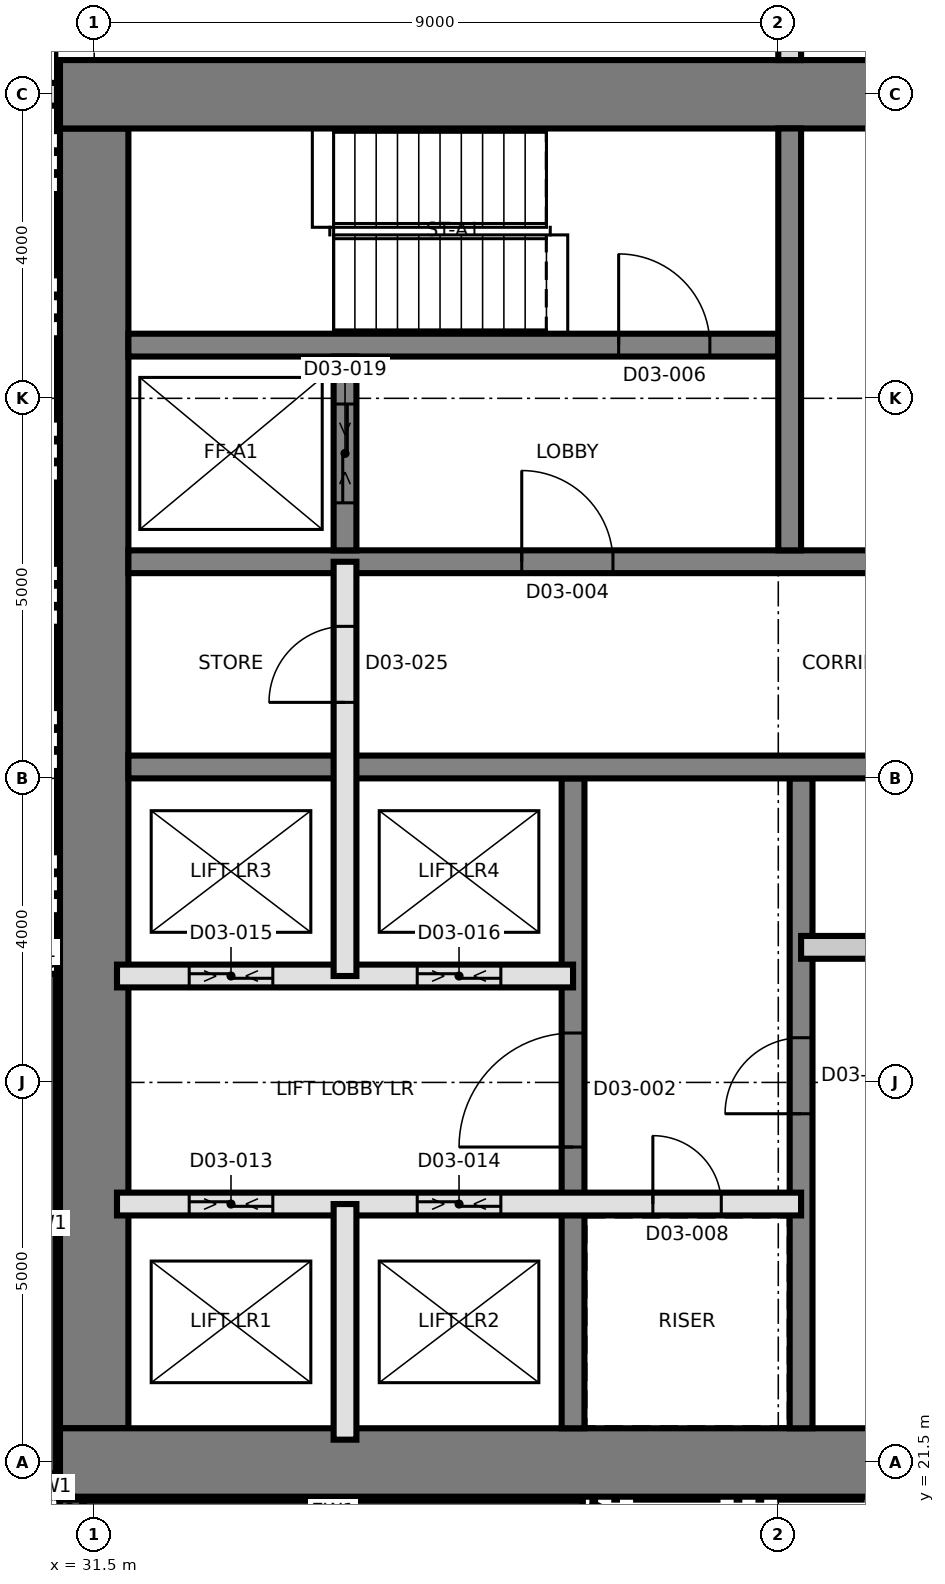
"""IFC4 building model, lengths in metres.
Left out: names, types, materials, properties, quantities, classifications, styles, units other than length and angle.
Written with IfcOpenShell. Run it as: python <this file> out.ifc"""

import sys

from ifc_helpers import new_model, si_unit, direction, frame, frame_2d, origin, place, context, subcontext, project, spatial, rectangle, extrude, element, fill, save


model = new_model("IFC4")
c1 = context("Model", 3, precision=1e-05, world=origin(), true_north=direction((0.0, 1.0)))
c2 = subcontext(c1, "Body", "Model", "MODEL_VIEW")
j1 = project(units=[si_unit("LENGTHUNIT", "METRE"), si_unit("PLANEANGLEUNIT", "RADIAN")], contexts=[c1])
p1 = place(None, origin())
s1 = spatial("IfcSite", under=j1, at=p1, CompositionType="ELEMENT")
p2 = place(p1, origin())
s2 = spatial("IfcBuilding", under=s1, at=p2, CompositionType="ELEMENT")
p3 = place(p2, frame((0.0, 0.0, 52.0)))
s3 = spatial("IfcBuildingStorey", under=s2, at=p3, CompositionType="ELEMENT", Elevation=52.0)
p4 = place(p3, frame((31.5, 21.95, 0.0), z_axis=(0.0, 0.0, 1.0), x_axis=(0.0, 1.0, 0.0)))
e1 = element("IfcWall", 1, at=p4, inside=s3, PredefinedType="SHEAR", context=c2, shape_type="SweptSolid", body=[
    extrude(rectangle(XDim=17.1, YDim=0.9, at=frame_2d((8.55, 0.0))), origin(), (0.0, 0.0, 1.0), 3.7),
])
p5 = place(p3, frame((31.05, 21.5, 0.0), z_axis=(0.0, 0.0, 1.0), x_axis=(1.0, 0.0, 0.0)))
e2 = element("IfcWall", 2, at=p5, inside=s3, PredefinedType="SHEAR", context=c2, shape_type="SweptSolid", body=[
    extrude(rectangle(XDim=27.0, YDim=0.9, at=frame_2d((13.5, 0.0))), origin(), (0.0, 0.0, 1.0), 3.7),
])
p6 = place(p3, frame((31.05, 39.5, 0.0), z_axis=(0.0, 0.0, 1.0), x_axis=(1.0, 0.0, 0.0)))
e3 = element("IfcWall", 3, at=p6, inside=s3, PredefinedType="SHEAR", context=c2, shape_type="SweptSolid", body=[
    extrude(rectangle(XDim=27.0, YDim=0.9, at=frame_2d((13.5, 0.0))), origin(), (0.0, 0.0, 1.0), 3.7),
])
p7 = place(p6, frame((10.65, 0.0, 0.0)))
e4 = element("IfcOpeningElement", 4, at=p7, cuts=e3, PredefinedType="OPENING", context=c2, shape_type="SweptSolid", body=[
    extrude(rectangle(XDim=1.2, YDim=2.1, at=frame_2d((0.6, 1.05))), frame((0.0, 0.46, 0.0), z_axis=(0.0, -1.0, 0.0), x_axis=(1.0, 0.0, 0.0)), (0.0, 0.0, 1.0), 0.92),
])
p8 = place(p3, frame((37.8, 21.95, 0.0), z_axis=(0.0, 0.0, 1.0), x_axis=(0.0, 1.0, 0.0)))
e5 = element("IfcWall", 5, at=p8, inside=s3, PredefinedType="SHEAR", context=c2, shape_type="SweptSolid", body=[
    extrude(rectangle(XDim=8.55, YDim=0.3, at=frame_2d((4.275, 0.0))), origin(), (0.0, 0.0, 1.0), 3.7),
])
p9 = place(p8, frame((3.7, 0.0, 0.0)))
e6 = element("IfcOpeningElement", 6, at=p9, cuts=e5, PredefinedType="OPENING", context=c2, shape_type="SweptSolid", body=[
    extrude(rectangle(XDim=1.5, YDim=2.1, at=frame_2d((0.75, 1.05))), frame((0.0, 0.16, 0.0), z_axis=(0.0, -1.0, 0.0), x_axis=(1.0, 0.0, 0.0)), (0.0, 0.0, 1.0), 0.32),
])
p10 = place(p3, frame((40.8, 21.95, 0.0), z_axis=(0.0, 0.0, 1.0), x_axis=(0.0, 1.0, 0.0)))
e7 = element("IfcWall", 7, at=p10, inside=s3, PredefinedType="SHEAR", context=c2, shape_type="SweptSolid", body=[
    extrude(rectangle(XDim=8.55, YDim=0.3, at=frame_2d((4.275, 0.0))), origin(), (0.0, 0.0, 1.0), 3.7),
])
p11 = place(p10, frame((4.138, 0.0, 0.0)))
e8 = element("IfcOpeningElement", 8, at=p11, cuts=e7, PredefinedType="OPENING", context=c2, shape_type="SweptSolid", body=[
    extrude(rectangle(XDim=1.0, YDim=2.1, at=frame_2d((0.5, 1.05))), frame((0.0, 0.16, 0.0), z_axis=(0.0, -1.0, 0.0), x_axis=(1.0, 0.0, 0.0)), (0.0, 0.0, 1.0), 0.32),
])
p12 = place(p3, frame((31.95, 30.65, 0.0), z_axis=(0.0, 0.0, 1.0), x_axis=(1.0, 0.0, 0.0)))
e9 = element("IfcWall", 9, at=p12, inside=s3, PredefinedType="SHEAR", context=c2, shape_type="SweptSolid", body=[
    extrude(rectangle(XDim=26.1, YDim=0.3, at=frame_2d((13.05, 0.0))), origin(), (0.0, 0.0, 1.0), 3.7),
])
p13 = place(p12, frame((24.55, 0.0, 0.0)))
e10 = element("IfcOpeningElement", 10, at=p13, cuts=e9, PredefinedType="OPENING", context=c2, shape_type="SweptSolid", body=[
    extrude(rectangle(XDim=1.0, YDim=2.1, at=frame_2d((0.5, 1.05))), frame((0.0, 0.16, 0.0), z_axis=(0.0, -1.0, 0.0), x_axis=(1.0, 0.0, 0.0)), (0.0, 0.0, 1.0), 0.32),
])
p14 = place(p12, frame((11.35, 0.0, 0.0)))
e11 = element("IfcOpeningElement", 11, at=p14, cuts=e9, PredefinedType="OPENING", context=c2, shape_type="SweptSolid", body=[
    extrude(rectangle(XDim=1.0, YDim=2.1, at=frame_2d((0.5, 1.05))), frame((0.0, 0.16, 0.0), z_axis=(0.0, -1.0, 0.0), x_axis=(1.0, 0.0, 0.0)), (0.0, 0.0, 1.0), 0.32),
])
p15 = place(p3, frame((31.95, 33.35, 0.0), z_axis=(0.0, 0.0, 1.0), x_axis=(1.0, 0.0, 0.0)))
e12 = element("IfcWall", 12, at=p15, inside=s3, PredefinedType="SHEAR", context=c2, shape_type="SweptSolid", body=[
    extrude(rectangle(XDim=26.1, YDim=0.3, at=frame_2d((13.05, 0.0))), origin(), (0.0, 0.0, 1.0), 3.7),
])
p16 = place(p15, frame((13.125, 0.0, 0.0)))
e13 = element("IfcOpeningElement", 13, at=p16, cuts=e12, PredefinedType="OPENING", context=c2, shape_type="SweptSolid", body=[
    extrude(rectangle(XDim=1.4, YDim=2.1, at=frame_2d((0.7, 1.05))), frame((0.0, 0.16, 0.0), z_axis=(0.0, -1.0, 0.0), x_axis=(1.0, 0.0, 0.0)), (0.0, 0.0, 1.0), 0.32),
])
p17 = place(p15, frame((5.175, 0.0, 0.0)))
e14 = element("IfcOpeningElement", 14, at=p17, cuts=e12, PredefinedType="OPENING", context=c2, shape_type="SweptSolid", body=[
    extrude(rectangle(XDim=1.2, YDim=2.1, at=frame_2d((0.6, 1.05))), frame((0.0, 0.16, 0.0), z_axis=(0.0, -1.0, 0.0), x_axis=(1.0, 0.0, 0.0)), (0.0, 0.0, 1.0), 0.32),
])
p18 = place(p15, frame((19.725, 0.0, 0.0)))
e15 = element("IfcOpeningElement", 15, at=p18, cuts=e12, PredefinedType="OPENING", context=c2, shape_type="SweptSolid", body=[
    extrude(rectangle(XDim=1.2, YDim=2.1, at=frame_2d((0.6, 1.05))), frame((0.0, 0.16, 0.0), z_axis=(0.0, -1.0, 0.0), x_axis=(1.0, 0.0, 0.0)), (0.0, 0.0, 1.0), 0.32),
])
p19 = place(p3, frame((31.95, 36.2, 0.0), z_axis=(0.0, 0.0, 1.0), x_axis=(1.0, 0.0, 0.0)))
e16 = element("IfcWall", 16, at=p19, inside=s3, PredefinedType="SHEAR", context=c2, shape_type="SweptSolid", body=[
    extrude(rectangle(XDim=8.55, YDim=0.3, at=frame_2d((4.275, 0.0))), origin(), (0.0, 0.0, 1.0), 3.7),
])
p20 = place(p19, frame((6.45, 0.0, 0.0)))
e17 = element("IfcOpeningElement", 17, at=p20, cuts=e16, PredefinedType="OPENING", context=c2, shape_type="SweptSolid", body=[
    extrude(rectangle(XDim=1.2, YDim=2.1, at=frame_2d((0.6, 1.05))), frame((0.0, 0.16, 0.0), z_axis=(0.0, -1.0, 0.0), x_axis=(1.0, 0.0, 0.0)), (0.0, 0.0, 1.0), 0.32),
])
p21 = place(p3, frame((40.65, 33.5, 0.0), z_axis=(0.0, 0.0, 1.0), x_axis=(0.0, 1.0, 0.0)))
e18 = element("IfcWall", 18, at=p21, inside=s3, PredefinedType="SHEAR", context=c2, shape_type="SweptSolid", body=[
    extrude(rectangle(XDim=5.55, YDim=0.3, at=frame_2d((2.775, 0.0))), origin(), (0.0, 0.0, 1.0), 3.7),
])
p22 = place(p3, frame((34.8, 33.5, 0.0), z_axis=(0.0, 0.0, 1.0), x_axis=(0.0, 1.0, 0.0)))
e19 = element("IfcWall", 19, at=p22, inside=s3, PredefinedType="SHEAR", context=c2, shape_type="SweptSolid", body=[
    extrude(rectangle(XDim=2.55, YDim=0.3, at=frame_2d((1.275, 0.0))), origin(), (0.0, 0.0, 1.0), 3.7),
])
p23 = place(p22, frame((0.625, 0.0, 0.0)))
e20 = element("IfcOpeningElement", 20, at=p23, cuts=e19, PredefinedType="OPENING", context=c2, shape_type="SweptSolid", body=[
    extrude(rectangle(XDim=1.3, YDim=2.4, at=frame_2d((0.65, 1.2))), frame((0.0, 0.16, 0.0), z_axis=(0.0, -1.0, 0.0), x_axis=(1.0, 0.0, 0.0)), (0.0, 0.0, 1.0), 0.32),
])
p24 = place(p3, frame((30.85, 27.929, 0.0), z_axis=(0.0, 0.0, 1.0), x_axis=(0.0, -1.0, 0.0)))
e21 = element("IfcWall", 21, at=p24, inside=s3, PredefinedType="SOLIDWALL", context=c2, shape_type="SweptSolid", body=[
    extrude(rectangle(XDim=6.569, YDim=0.3, at=frame_2d((3.285, 0.0))), origin(), (0.0, 0.0, 1.0), 3.4),
])
for number, where, z_axis, x_axis in (
    (22, (30.861, 21.302, 0.0), (0.0, 0.0, 1.0), (0.383, -0.924, 0.0)),
    (23, (31.048, 20.967, 0.0), (0.0, 0.0, 1.0), (0.924, -0.383, 0.0)),
):
    element("IfcWall", number, at=place(p3, frame(where, z_axis=z_axis, x_axis=x_axis)), inside=s3, PredefinedType="SOLIDWALL", context=c2, shape_type="SweptSolid", body=[
        extrude(rectangle(XDim=0.275, YDim=0.3, at=frame_2d((0.138, 0.0))), origin(), (0.0, 0.0, 1.0), 3.4),
    ])
p25 = place(p3, frame((31.36, 20.85, 0.0), z_axis=(0.0, 0.0, 1.0), x_axis=(1.0, 0.0, 0.0)))
e24 = element("IfcWall", 24, at=p25, inside=s3, PredefinedType="SOLIDWALL", context=c2, shape_type="SweptSolid", body=[
    extrude(rectangle(XDim=6.569, YDim=0.3, at=frame_2d((3.285, 0.0))), origin(), (0.0, 0.0, 1.0), 3.4),
])
for number, where, z_axis, x_axis in (
    (25, (37.995, 20.834, 0.0), (0.0, 0.0, 1.0), (0.897, -0.442, 0.0)),
    (26, (30.613, 28.444, 0.0), (0.0, 0.0, 1.0), (0.442, -0.897, 0.0)),
):
    element("IfcWall", number, at=place(p3, frame(where, z_axis=z_axis, x_axis=x_axis)), inside=s3, PredefinedType="SOLIDWALL", context=c2, shape_type="SweptSolid", body=[
        extrude(rectangle(XDim=0.501, YDim=0.3, at=frame_2d((0.25, 0.0))), origin(), (0.0, 0.0, 1.0), 3.4),
    ])
p26 = place(p3, frame((31.8, 24.9, 0.0), z_axis=(0.0, 0.0, 1.0), x_axis=(1.0, 0.0, 0.0)))
e27 = element("IfcWall", 27, at=p26, inside=s3, PredefinedType="SOLIDWALL", context=c2, shape_type="SweptSolid", body=[
    extrude(rectangle(XDim=9.0, YDim=0.3, at=frame_2d((4.5, 0.0))), origin(), (0.0, 0.0, 1.0), 3.4),
])
p27 = place(p26, frame((7.05, 0.0, 0.0)))
e28 = element("IfcOpeningElement", 28, at=p27, cuts=e27, PredefinedType="OPENING", context=c2, shape_type="SweptSolid", body=[
    extrude(rectangle(XDim=0.9, YDim=2.1, at=frame_2d((0.45, 1.05))), frame((0.0, 0.16, 0.0), z_axis=(0.0, -1.0, 0.0), x_axis=(1.0, 0.0, 0.0)), (0.0, 0.0, 1.0), 0.32),
])
p28 = place(p26, frame((0.95, 0.0, 0.0)))
e29 = element("IfcOpeningElement", 29, at=p28, cuts=e27, PredefinedType="OPENING", context=c2, shape_type="SweptSolid", body=[
    extrude(rectangle(XDim=1.1, YDim=2.4, at=frame_2d((0.55, 1.2))), frame((0.0, 0.16, 0.0), z_axis=(0.0, -1.0, 0.0), x_axis=(1.0, 0.0, 0.0)), (0.0, 0.0, 1.0), 0.32),
])
p29 = place(p26, frame((3.95, 0.0, 0.0)))
e30 = element("IfcOpeningElement", 30, at=p29, cuts=e27, PredefinedType="OPENING", context=c2, shape_type="SweptSolid", body=[
    extrude(rectangle(XDim=1.1, YDim=2.4, at=frame_2d((0.55, 1.2))), frame((0.0, 0.16, 0.0), z_axis=(0.0, -1.0, 0.0), x_axis=(1.0, 0.0, 0.0)), (0.0, 0.0, 1.0), 0.32),
])
p30 = place(p3, frame((31.8, 27.9, 0.0), z_axis=(0.0, 0.0, 1.0), x_axis=(1.0, 0.0, 0.0)))
e31 = element("IfcWall", 31, at=p30, inside=s3, PredefinedType="SOLIDWALL", context=c2, shape_type="SweptSolid", body=[
    extrude(rectangle(XDim=6.0, YDim=0.3, at=frame_2d((3.0, 0.0))), origin(), (0.0, 0.0, 1.0), 3.4),
])
p31 = place(p30, frame((0.95, 0.0, 0.0)))
e32 = element("IfcOpeningElement", 32, at=p31, cuts=e31, PredefinedType="OPENING", context=c2, shape_type="SweptSolid", body=[
    extrude(rectangle(XDim=1.1, YDim=2.4, at=frame_2d((0.55, 1.2))), frame((0.0, 0.16, 0.0), z_axis=(0.0, -1.0, 0.0), x_axis=(1.0, 0.0, 0.0)), (0.0, 0.0, 1.0), 0.32),
])
p32 = place(p30, frame((3.95, 0.0, 0.0)))
e33 = element("IfcOpeningElement", 33, at=p32, cuts=e31, PredefinedType="OPENING", context=c2, shape_type="SweptSolid", body=[
    extrude(rectangle(XDim=1.1, YDim=2.4, at=frame_2d((0.55, 1.2))), frame((0.0, 0.16, 0.0), z_axis=(0.0, -1.0, 0.0), x_axis=(1.0, 0.0, 0.0)), (0.0, 0.0, 1.0), 0.32),
])
p33 = place(p3, frame((40.8, 28.277, 0.0), z_axis=(0.0, 0.0, 1.0), x_axis=(1.0, 0.0, 0.0)))
e34 = element("IfcWall", 34, at=p33, inside=s3, PredefinedType="PARTITIONING", context=c2, shape_type="SweptSolid", body=[
    extrude(rectangle(XDim=6.0, YDim=0.3, at=frame_2d((3.0, 0.0))), origin(), (0.0, 0.0, 1.0), 3.4),
])
p34 = place(p3, frame((34.8, 21.8, 0.0), z_axis=(0.0, 0.0, 1.0), x_axis=(0.0, 1.0, 0.0)))
e35 = element("IfcWall", 35, at=p34, inside=s3, PredefinedType="SOLIDWALL", context=c2, shape_type="SweptSolid", body=[
    extrude(rectangle(XDim=3.1, YDim=0.3, at=frame_2d((1.55, 0.0))), origin(), (0.0, 0.0, 1.0), 3.4),
])
p35 = place(p3, frame((34.8, 27.9, 0.0), z_axis=(0.0, 0.0, 1.0), x_axis=(0.0, 1.0, 0.0)))
e36 = element("IfcWall", 36, at=p35, inside=s3, PredefinedType="SOLIDWALL", context=c2, shape_type="SweptSolid", body=[
    extrude(rectangle(XDim=5.45, YDim=0.3, at=frame_2d((2.725, 0.0))), origin(), (0.0, 0.0, 1.0), 3.4),
])
p36 = place(p35, frame((3.6, 0.0, 0.0)))
e37 = element("IfcOpeningElement", 37, at=p36, cuts=e36, PredefinedType="OPENING", context=c2, shape_type="SweptSolid", body=[
    extrude(rectangle(XDim=1.0, YDim=2.1, at=frame_2d((0.5, 1.05))), frame((0.0, 0.16, 0.0), z_axis=(0.0, -1.0, 0.0), x_axis=(1.0, 0.0, 0.0)), (0.0, 0.0, 1.0), 0.32),
])
p37 = place(p3, frame((29.705, 39.5, 0.0), z_axis=(0.0, 0.0, 1.0), x_axis=(1.0, 0.0, 0.0)))
e38 = element("IfcWall", 38, at=p37, inside=s3, PredefinedType="PARTITIONING", context=c2, shape_type="SweptSolid", body=[
    extrude(rectangle(XDim=1.325, YDim=0.3, at=frame_2d((0.663, 0.0))), origin(), (0.0, 0.0, 1.0), 3.4),
])
p38 = place(p3, frame((40.65, 39.95, 0.0), z_axis=(0.0, 0.0, 1.0), x_axis=(0.0, 1.0, 0.0)))
e39 = element("IfcWall", 39, at=p38, inside=s3, PredefinedType="PARTITIONING", context=c2, shape_type="SweptSolid", body=[
    extrude(rectangle(XDim=37.05, YDim=0.3, at=frame_2d((18.525, 0.0))), origin(), (0.0, 0.0, 1.0), 3.4),
])
p39 = place(p38, frame((1.9, 0.0, 0.0)))
e40 = element("IfcOpeningElement", 40, at=p39, cuts=e39, PredefinedType="OPENING", context=c2, shape_type="SweptSolid", body=[
    extrude(rectangle(XDim=1.0, YDim=2.4, at=frame_2d((0.5, 1.2))), frame((0.0, 0.16, 0.0), z_axis=(0.0, -1.0, 0.0), x_axis=(1.0, 0.0, 0.0)), (0.0, 0.0, 1.0), 0.32),
])
p40 = place(p38, frame((14.2, 0.0, 0.0)))
e41 = element("IfcOpeningElement", 41, at=p40, cuts=e39, PredefinedType="OPENING", context=c2, shape_type="SweptSolid", body=[
    extrude(rectangle(XDim=1.0, YDim=2.4, at=frame_2d((0.5, 1.2))), frame((0.0, 0.16, 0.0), z_axis=(0.0, -1.0, 0.0), x_axis=(1.0, 0.0, 0.0)), (0.0, 0.0, 1.0), 0.32),
])
p41 = place(p38, frame((21.05, 0.0, 0.0)))
e42 = element("IfcOpeningElement", 42, at=p41, cuts=e39, PredefinedType="OPENING", context=c2, shape_type="SweptSolid", body=[
    extrude(rectangle(XDim=1.0, YDim=2.4, at=frame_2d((0.5, 1.2))), frame((0.0, 0.16, 0.0), z_axis=(0.0, -1.0, 0.0), x_axis=(1.0, 0.0, 0.0)), (0.0, 0.0, 1.0), 0.32),
])
p42 = place(p9, origin())
e43 = element("IfcDoor", 43, at=p42, inside=s3, OperationType="SINGLE_SWING_LEFT", PredefinedType="DOOR", context=c2, shape_type="SweptSolid", body=[
    extrude(rectangle(XDim=1.5, YDim=2.1, at=frame_2d((0.75, 1.05))), frame((0.0, 0.025, 0.0), z_axis=(0.0, -1.0, 0.0), x_axis=(1.0, 0.0, 0.0)), (0.0, 0.0, 1.0), 0.05),
])
fill(e6, e43)
p43 = place(p17, origin())
e44 = element("IfcDoor", 44, at=p43, inside=s3, OperationType="SINGLE_SWING_LEFT", PredefinedType="DOOR", context=c2, shape_type="SweptSolid", body=[
    extrude(rectangle(XDim=1.2, YDim=2.1, at=frame_2d((0.6, 1.05))), frame((0.0, 0.025, 0.0), z_axis=(0.0, -1.0, 0.0), x_axis=(1.0, 0.0, 0.0)), (0.0, 0.0, 1.0), 0.05),
])
fill(e14, e44)
p44 = place(p20, origin())
e45 = element("IfcDoor", 45, at=p44, inside=s3, OperationType="SINGLE_SWING_RIGHT", PredefinedType="DOOR", context=c2, shape_type="SweptSolid", body=[
    extrude(rectangle(XDim=1.2, YDim=2.1, at=frame_2d((0.6, 1.05))), frame((0.0, 0.025, 0.0), z_axis=(0.0, -1.0, 0.0), x_axis=(1.0, 0.0, 0.0)), (0.0, 0.0, 1.0), 0.05),
])
fill(e17, e45)
p45 = place(p27, origin())
e46 = element("IfcDoor", 46, at=p45, inside=s3, OperationType="SINGLE_SWING_LEFT", PredefinedType="DOOR", context=c2, shape_type="SweptSolid", body=[
    extrude(rectangle(XDim=0.9, YDim=2.1, at=frame_2d((0.45, 1.05))), frame((0.0, 0.025, 0.0), z_axis=(0.0, -1.0, 0.0), x_axis=(1.0, 0.0, 0.0)), (0.0, 0.0, 1.0), 0.05),
])
fill(e28, e46)
p46 = place(p28, origin())
e47 = element("IfcDoor", 47, at=p46, inside=s3, OperationType="SLIDING_TO_LEFT", PredefinedType="DOOR", context=c2, shape_type="SweptSolid", body=[
    extrude(rectangle(XDim=1.1, YDim=2.4, at=frame_2d((0.55, 1.2))), frame((0.0, 0.025, 0.0), z_axis=(0.0, -1.0, 0.0), x_axis=(1.0, 0.0, 0.0)), (0.0, 0.0, 1.0), 0.05),
])
fill(e29, e47)
p47 = place(p29, origin())
e48 = element("IfcDoor", 48, at=p47, inside=s3, OperationType="SLIDING_TO_LEFT", PredefinedType="DOOR", context=c2, shape_type="SweptSolid", body=[
    extrude(rectangle(XDim=1.1, YDim=2.4, at=frame_2d((0.55, 1.2))), frame((0.0, 0.025, 0.0), z_axis=(0.0, -1.0, 0.0), x_axis=(1.0, 0.0, 0.0)), (0.0, 0.0, 1.0), 0.05),
])
fill(e30, e48)
p48 = place(p31, origin())
e49 = element("IfcDoor", 49, at=p48, inside=s3, OperationType="SLIDING_TO_LEFT", PredefinedType="DOOR", context=c2, shape_type="SweptSolid", body=[
    extrude(rectangle(XDim=1.1, YDim=2.4, at=frame_2d((0.55, 1.2))), frame((0.0, 0.025, 0.0), z_axis=(0.0, -1.0, 0.0), x_axis=(1.0, 0.0, 0.0)), (0.0, 0.0, 1.0), 0.05),
])
fill(e32, e49)
p49 = place(p32, origin())
e50 = element("IfcDoor", 50, at=p49, inside=s3, OperationType="SLIDING_TO_LEFT", PredefinedType="DOOR", context=c2, shape_type="SweptSolid", body=[
    extrude(rectangle(XDim=1.1, YDim=2.4, at=frame_2d((0.55, 1.2))), frame((0.0, 0.025, 0.0), z_axis=(0.0, -1.0, 0.0), x_axis=(1.0, 0.0, 0.0)), (0.0, 0.0, 1.0), 0.05),
])
fill(e33, e50)
p50 = place(p23, origin())
e51 = element("IfcDoor", 51, at=p50, inside=s3, OperationType="SLIDING_TO_LEFT", PredefinedType="DOOR", context=c2, shape_type="SweptSolid", body=[
    extrude(rectangle(XDim=1.3, YDim=2.4, at=frame_2d((0.65, 1.2))), frame((0.0, 0.025, 0.0), z_axis=(0.0, -1.0, 0.0), x_axis=(1.0, 0.0, 0.0)), (0.0, 0.0, 1.0), 0.05),
])
fill(e20, e51)
p51 = place(p11, origin())
e52 = element("IfcDoor", 52, at=p51, inside=s3, OperationType="SINGLE_SWING_RIGHT", PredefinedType="DOOR", context=c2, shape_type="SweptSolid", body=[
    extrude(rectangle(XDim=1.0, YDim=2.1, at=frame_2d((0.5, 1.05))), frame((0.0, 0.025, 0.0), z_axis=(0.0, -1.0, 0.0), x_axis=(1.0, 0.0, 0.0)), (0.0, 0.0, 1.0), 0.05),
])
fill(e8, e52)
p52 = place(p36, origin())
e53 = element("IfcDoor", 53, at=p52, inside=s3, OperationType="SINGLE_SWING_LEFT", PredefinedType="DOOR", context=c2, shape_type="SweptSolid", body=[
    extrude(rectangle(XDim=1.0, YDim=2.1, at=frame_2d((0.5, 1.05))), frame((0.0, 0.025, 0.0), z_axis=(0.0, -1.0, 0.0), x_axis=(1.0, 0.0, 0.0)), (0.0, 0.0, 1.0), 0.05),
])
fill(e37, e53)
save(model, sys.argv[1])
